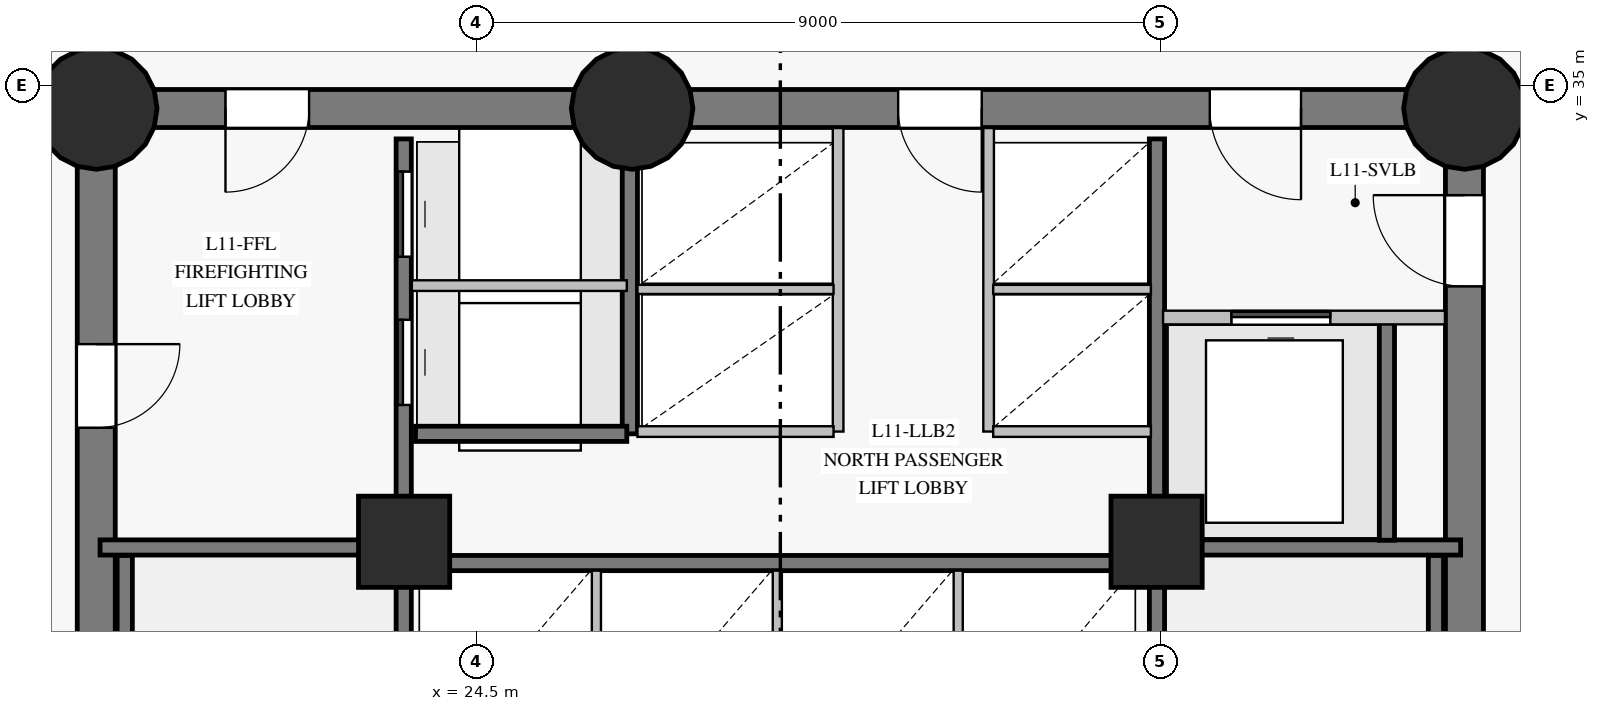
"""IFC4 building model, lengths in metres.
Left out: names, types, materials, properties, quantities, classifications, styles, units other than length and angle.
Written with IfcOpenShell. Run it as: python <this file> out.ifc"""

import sys

from ifc_helpers import new_model, si_unit, direction, frame, frame_2d, origin, origin_with_axes, origin_2d, place, context, subcontext, project, spatial, rectangle, circle, extrude, source, transform, mapped, element, fill, save


model = new_model("IFC4")
c1 = context("Model", 3, precision=1e-05, world=origin(), true_north=direction((0.0, 1.0)))
c2 = subcontext(c1, "Body", "Model", "MODEL_VIEW")
j1 = project(units=[si_unit("LENGTHUNIT", "METRE"), si_unit("PLANEANGLEUNIT", "RADIAN")], contexts=[c1])
p1 = place(None, origin())
s1 = spatial("IfcSite", under=j1, at=p1, CompositionType="ELEMENT")
p2 = place(p1, origin())
s2 = spatial("IfcBuilding", under=s1, at=p2, CompositionType="ELEMENT")
p3 = place(p2, frame((0.0, 0.0, 44.5)))
s3 = spatial("IfcBuildingStorey", under=s2, at=p3, CompositionType="ELEMENT", Elevation=44.5)
p4 = place(p3, frame((37.5, 18.3, 0.0), z_axis=(0.0, 0.0, 1.0), x_axis=(0.0, 1.0, 0.0)))
e1 = element("IfcWall", 1, at=p4, inside=s3, PredefinedType="SHEAR", context=c2, shape_type="SweptSolid", body=[
    extrude(rectangle(XDim=16.4, YDim=0.5, at=frame_2d((8.2, 0.0))), origin(), (0.0, 0.0, 1.0), 3.35),
])
p5 = place(p4, frame((14.06, 0.0, 0.0)))
e2 = element("IfcOpeningElement", 2, at=p5, cuts=e1, PredefinedType="OPENING", context=c2, shape_type="SweptSolid", body=[
    extrude(rectangle(XDim=1.2, YDim=2.15, at=frame_2d((0.6, 1.075))), frame((0.0, 0.26, 0.0), z_axis=(0.0, -1.0, 0.0), x_axis=(1.0, 0.0, 0.0)), (0.0, 0.0, 1.0), 0.52),
])
p6 = place(p3, frame((37.5, 34.7, 0.0), z_axis=(0.0, 0.0, 1.0), x_axis=(-1.0, 0.0, 0.0)))
e3 = element("IfcWall", 3, at=p6, inside=s3, PredefinedType="SHEAR", context=c2, shape_type="SweptSolid", body=[
    extrude(rectangle(XDim=10.95, YDim=0.5, at=frame_2d((5.475, 0.0))), origin(), (0.0, 0.0, 1.0), 3.35),
])
p7 = place(p6, frame((2.15, 0.0, 0.0)))
e4 = element("IfcOpeningElement", 4, at=p7, cuts=e3, PredefinedType="OPENING", context=c2, shape_type="SweptSolid", body=[
    extrude(rectangle(XDim=1.2, YDim=2.15, at=frame_2d((0.6, 1.075))), frame((0.0, 0.26, 0.0), z_axis=(0.0, -1.0, 0.0), x_axis=(1.0, 0.0, 0.0)), (0.0, 0.0, 1.0), 0.52),
])
p8 = place(p6, frame((6.35, 0.0, 0.0)))
e5 = element("IfcOpeningElement", 5, at=p8, cuts=e3, PredefinedType="OPENING", context=c2, shape_type="SweptSolid", body=[
    extrude(rectangle(XDim=1.1, YDim=2.15, at=frame_2d((0.55, 1.075))), frame((0.0, 0.26, 0.0), z_axis=(0.0, -1.0, 0.0), x_axis=(1.0, 0.0, 0.0)), (0.0, 0.0, 1.0), 0.52),
])
p9 = place(p3, frame((26.55, 34.7, 0.0), z_axis=(0.0, 0.0, 1.0), x_axis=(-1.0, 0.0, 0.0)))
e6 = element("IfcWall", 6, at=p9, inside=s3, PredefinedType="SHEAR", context=c2, shape_type="SweptSolid", body=[
    extrude(rectangle(XDim=7.05, YDim=0.5, at=frame_2d((3.525, 0.0))), origin(), (0.0, 0.0, 1.0), 3.35),
])
p10 = place(p9, frame((4.25, 0.0, 0.0)))
e7 = element("IfcOpeningElement", 7, at=p10, cuts=e6, PredefinedType="OPENING", context=c2, shape_type="SweptSolid", body=[
    extrude(rectangle(XDim=1.1, YDim=2.15, at=frame_2d((0.55, 1.075))), frame((0.0, 0.26, 0.0), z_axis=(0.0, -1.0, 0.0), x_axis=(1.0, 0.0, 0.0)), (0.0, 0.0, 1.0), 0.52),
])
p11 = place(p3, frame((19.5, 34.7, 0.0), z_axis=(0.0, 0.0, 1.0), x_axis=(0.0, -1.0, 0.0)))
e8 = element("IfcWall", 8, at=p11, inside=s3, PredefinedType="SHEAR", context=c2, shape_type="SweptSolid", body=[
    extrude(rectangle(XDim=16.4, YDim=0.5, at=frame_2d((8.2, 0.0))), origin(), (0.0, 0.0, 1.0), 3.35),
])
p12 = place(p11, frame((3.1, 0.0, 0.0)))
e9 = element("IfcOpeningElement", 9, at=p12, cuts=e8, PredefinedType="OPENING", context=c2, shape_type="SweptSolid", body=[
    extrude(rectangle(XDim=1.1, YDim=2.15, at=frame_2d((0.55, 1.075))), frame((0.0, 0.26, 0.0), z_axis=(0.0, -1.0, 0.0), x_axis=(1.0, 0.0, 0.0)), (0.0, 0.0, 1.0), 0.52),
])
m1 = source(origin_with_axes(), c2, "Body", "SweptSolid", [
    extrude(circle(Radius=0.8, at=origin_2d()), origin(), (0.0, 0.0, 1.0), 3.6),
])
for number, where, z_axis, x_axis in (
    (10, (19.5, 34.7, 0.0), (0.0, 0.0, 1.0), (1.0, 0.0, 0.0)),
    (11, (26.55, 34.7, 0.0), (0.0, 0.0, 1.0), (1.0, 0.0, 0.0)),
    (12, (37.5, 34.7, 0.0), (0.0, 0.0, 1.0), (1.0, 0.0, 0.0)),
):
    element("IfcColumn", number, at=place(p3, frame(where, z_axis=z_axis, x_axis=x_axis)), inside=s3, PredefinedType="COLUMN", context=c2, shape_type="MappedRepresentation", body=[
        mapped(m1, transform((0.0, 0.0, 0.0), scale=1.0)),
    ])
m2 = source(origin_with_axes(), c2, "Body", "SweptSolid", [
    extrude(rectangle(XDim=1.2, YDim=1.2, at=origin_2d()), origin(), (0.0, 0.0, 1.0), 3.6),
])
for number, where, z_axis, x_axis in (
    (13, (23.55, 29.0, 0.0), (0.0, 0.0, 1.0), (1.0, 0.0, 0.0)),
    (14, (33.45, 29.0, 0.0), (0.0, 0.0, 1.0), (1.0, 0.0, 0.0)),
):
    element("IfcColumn", number, at=place(p3, frame(where, z_axis=z_axis, x_axis=x_axis)), inside=s3, PredefinedType="COLUMN", context=c2, shape_type="MappedRepresentation", body=[
        mapped(m2, transform((0.0, 0.0, 0.0), scale=1.0)),
    ])
p13 = place(p3, frame((23.545, 18.7, 0.0), z_axis=(0.0, 0.0, 1.0), x_axis=(0.0, 1.0, 0.0)))
e15 = element("IfcWall", 15, at=p13, inside=s3, PredefinedType="SHEAR", context=c2, shape_type="SweptSolid", body=[
    extrude(rectangle(XDim=15.6, YDim=0.2, at=frame_2d((7.8, 0.0))), origin(), (0.0, 0.0, 1.0), 3.35),
])
p14 = place(p13, frame((2.75, 0.0, 0.0)))
e16 = element("IfcOpeningElement", 16, at=p14, cuts=e15, PredefinedType="OPENING", context=c2, shape_type="SweptSolid", body=[
    extrude(rectangle(XDim=1.15, YDim=2.15, at=frame_2d((0.575, 1.075))), frame((0.0, 0.11, 0.0), z_axis=(0.0, -1.0, 0.0), x_axis=(1.0, 0.0, 0.0)), (0.0, 0.0, 1.0), 0.22),
])
p15 = place(p13, frame((0.14, 0.0, 0.0)))
e17 = element("IfcOpeningElement", 17, at=p15, cuts=e15, PredefinedType="OPENING", context=c2, shape_type="SweptSolid", body=[
    extrude(rectangle(XDim=0.88, YDim=2.1, at=frame_2d((0.44, 1.05))), frame((0.0, 0.11, 0.0), z_axis=(0.0, -1.0, 0.0), x_axis=(1.0, 0.0, 0.0)), (0.0, 0.0, 1.0), 0.22),
])
p16 = place(p13, frame((1.36, 0.0, 0.0)))
e18 = element("IfcOpeningElement", 18, at=p16, cuts=e15, PredefinedType="OPENING", context=c2, shape_type="SweptSolid", body=[
    extrude(rectangle(XDim=0.88, YDim=2.1, at=frame_2d((0.44, 1.05))), frame((0.0, 0.11, 0.0), z_axis=(0.0, -1.0, 0.0), x_axis=(1.0, 0.0, 0.0)), (0.0, 0.0, 1.0), 0.22),
])
p17 = place(p13, frame((12.1, 0.0, 0.0)))
e19 = element("IfcOpeningElement", 19, at=p17, cuts=e15, PredefinedType="OPENING", context=c2, shape_type="SweptSolid", body=[
    extrude(rectangle(XDim=1.12, YDim=2.15, at=frame_2d((0.56, 1.075))), frame((0.0, 0.11, 0.0), z_axis=(0.0, -1.0, 0.0), x_axis=(1.0, 0.0, 0.0)), (0.0, 0.0, 1.0), 0.22),
])
p18 = place(p13, frame((14.05, 0.0, 0.0)))
e20 = element("IfcOpeningElement", 20, at=p18, cuts=e15, PredefinedType="OPENING", context=c2, shape_type="SweptSolid", body=[
    extrude(rectangle(XDim=1.12, YDim=2.15, at=frame_2d((0.56, 1.075))), frame((0.0, 0.11, 0.0), z_axis=(0.0, -1.0, 0.0), x_axis=(1.0, 0.0, 0.0)), (0.0, 0.0, 1.0), 0.22),
])
p19 = place(p3, frame((33.455, 18.7, 0.0), z_axis=(0.0, 0.0, 1.0), x_axis=(0.0, 1.0, 0.0)))
e21 = element("IfcWall", 21, at=p19, inside=s3, PredefinedType="SHEAR", context=c2, shape_type="SweptSolid", body=[
    extrude(rectangle(XDim=15.6, YDim=0.2, at=frame_2d((7.8, 0.0))), origin(), (0.0, 0.0, 1.0), 3.35),
])
p20 = place(p19, frame((2.75, 0.0, 0.0)))
e22 = element("IfcOpeningElement", 22, at=p20, cuts=e21, PredefinedType="OPENING", context=c2, shape_type="SweptSolid", body=[
    extrude(rectangle(XDim=1.15, YDim=2.15, at=frame_2d((0.575, 1.075))), frame((0.0, 0.11, 0.0), z_axis=(0.0, -1.0, 0.0), x_axis=(1.0, 0.0, 0.0)), (0.0, 0.0, 1.0), 0.22),
])
p21 = place(p19, frame((0.55, 0.0, 0.0)))
e23 = element("IfcOpeningElement", 23, at=p21, cuts=e21, PredefinedType="OPENING", context=c2, shape_type="SweptSolid", body=[
    extrude(rectangle(XDim=0.94, YDim=2.1, at=frame_2d((0.47, 1.05))), frame((0.0, 0.11, 0.0), z_axis=(0.0, -1.0, 0.0), x_axis=(1.0, 0.0, 0.0)), (0.0, 0.0, 1.0), 0.22),
])
p22 = place(p3, frame((23.7, 28.72, 0.0), z_axis=(0.0, 0.0, 1.0), x_axis=(1.0, 0.0, 0.0)))
e24 = element("IfcWall", 24, at=p22, inside=s3, PredefinedType="SHEAR", context=c2, shape_type="SweptSolid", body=[
    extrude(rectangle(XDim=9.6, YDim=0.2, at=frame_2d((4.8, 0.0))), origin(), (0.0, 0.0, 1.0), 3.35),
])
for number, where, z_axis, x_axis in (
    (25, (19.875, 21.32, 0.0), (0.0, 0.0, 1.0), (0.0, 1.0, 0.0)),
    (26, (37.125, 21.32, 0.0), (0.0, 0.0, 1.0), (0.0, 1.0, 0.0)),
):
    element("IfcWall", number, at=place(p3, frame(where, z_axis=z_axis, x_axis=x_axis)), inside=s3, PredefinedType="SHEAR", context=c2, shape_type="SweptSolid", body=[
        extrude(rectangle(XDim=7.5, YDim=0.2, at=frame_2d((3.75, 0.0))), origin(), (0.0, 0.0, 1.0), 3.35),
    ])
for number, where, z_axis, x_axis in (
    (27, (33.455, 28.925, 0.0), (0.0, 0.0, 1.0), (1.0, 0.0, 0.0)),
    (28, (19.55, 28.925, 0.0), (0.0, 0.0, 1.0), (1.0, 0.0, 0.0)),
):
    element("IfcWall", number, at=place(p3, frame(where, z_axis=z_axis, x_axis=x_axis)), inside=s3, PredefinedType="SHEAR", context=c2, shape_type="SweptSolid", body=[
        extrude(rectangle(XDim=3.995, YDim=0.2, at=frame_2d((1.998, 0.0))), origin(), (0.0, 0.0, 1.0), 3.35),
    ])
p23 = place(p3, frame((26.52, 30.42, 0.0), z_axis=(0.0, 0.0, 1.0), x_axis=(0.0, 1.0, 0.0)))
e29 = element("IfcWall", 29, at=p23, inside=s3, PredefinedType="SHEAR", context=c2, shape_type="SweptSolid", body=[
    extrude(rectangle(XDim=3.86, YDim=0.2, at=frame_2d((1.93, 0.0))), origin(), (0.0, 0.0, 1.0), 3.35),
])
p24 = place(p3, frame((36.48, 29.02, 0.0), z_axis=(0.0, 0.0, 1.0), x_axis=(0.0, 1.0, 0.0)))
e30 = element("IfcWall", 30, at=p24, inside=s3, PredefinedType="SHEAR", context=c2, shape_type="SweptSolid", body=[
    extrude(rectangle(XDim=2.86, YDim=0.2, at=frame_2d((1.43, 0.0))), origin(), (0.0, 0.0, 1.0), 3.35),
])
p25 = place(p3, frame((23.7, 30.42, 0.0), z_axis=(0.0, 0.0, 1.0), x_axis=(1.0, 0.0, 0.0)))
e31 = element("IfcWall", 31, at=p25, inside=s3, PredefinedType="SHEAR", context=c2, shape_type="SweptSolid", body=[
    extrude(rectangle(XDim=2.78, YDim=0.2, at=frame_2d((1.39, 0.0))), origin(), (0.0, 0.0, 1.0), 3.35),
])
for number, where, z_axis, x_axis in (
    (32, (29.26, 30.45, 0.0), (0.0, 0.0, 1.0), (0.0, 1.0, 0.0)),
    (33, (31.24, 30.45, 0.0), (0.0, 0.0, 1.0), (0.0, 1.0, 0.0)),
):
    element("IfcWall", number, at=place(p3, frame(where, z_axis=z_axis, x_axis=x_axis)), inside=s3, PredefinedType="PARTITIONING", context=c2, shape_type="SweptSolid", body=[
        extrude(rectangle(XDim=3.993, YDim=0.14, at=frame_2d((1.997, 0.0))), origin(), (0.0, 0.0, 1.0), 3.35),
    ])
p26 = place(p3, frame((33.535, 31.95, 0.0), z_axis=(0.0, 0.0, 1.0), x_axis=(1.0, 0.0, 0.0)))
e34 = element("IfcWall", 34, at=p26, inside=s3, PredefinedType="PARTITIONING", context=c2, shape_type="SweptSolid", body=[
    extrude(rectangle(XDim=3.709, YDim=0.18, at=frame_2d((1.854, 0.0))), origin(), (0.0, 0.0, 1.0), 3.35),
])
p27 = place(p26, frame((0.9, 0.0, 0.0)))
e35 = element("IfcOpeningElement", 35, at=p27, cuts=e34, PredefinedType="OPENING", context=c2, shape_type="SweptSolid", body=[
    extrude(rectangle(XDim=1.3, YDim=2.2, at=frame_2d((0.65, 1.1))), frame((0.0, 0.1, 0.0), z_axis=(0.0, -1.0, 0.0), x_axis=(1.0, 0.0, 0.0)), (0.0, 0.0, 1.0), 0.2),
])
p28 = place(p3, frame((23.652, 32.37, 0.0), z_axis=(0.0, 0.0, 1.0), x_axis=(1.0, 0.0, 0.0)))
e36 = element("IfcWall", 36, at=p28, inside=s3, PredefinedType="PARTITIONING", context=c2, shape_type="SweptSolid", body=[
    extrude(rectangle(XDim=2.828, YDim=0.14, at=frame_2d((1.414, 0.0))), origin(), (0.0, 0.0, 1.0), 3.35),
])
for number, where, z_axis, x_axis in (
    (37, (26.08, 26.02, 0.0), (0.0, 0.0, 1.0), (0.0, 1.0, 0.0)),
    (38, (28.46, 26.02, 0.0), (0.0, 0.0, 1.0), (0.0, 1.0, 0.0)),
    (39, (30.84, 26.02, 0.0), (0.0, 0.0, 1.0), (0.0, 1.0, 0.0)),
):
    element("IfcWall", number, at=place(p3, frame(where, z_axis=z_axis, x_axis=x_axis)), inside=s3, PredefinedType="PARTITIONING", context=c2, shape_type="SweptSolid", body=[
        extrude(rectangle(XDim=2.6, YDim=0.12, at=frame_2d((1.3, 0.0))), origin(), (0.0, 0.0, 1.0), 3.35),
    ])
p29 = place(p3, frame((26.62, 30.45, 0.0), z_axis=(0.0, 0.0, 1.0), x_axis=(1.0, 0.0, 0.0)))
e40 = element("IfcWall", 40, at=p29, inside=s3, PredefinedType="PARTITIONING", context=c2, shape_type="SweptSolid", body=[
    extrude(rectangle(XDim=2.58, YDim=0.14, at=frame_2d((1.29, 0.0))), origin(), (0.0, 0.0, 1.0), 3.35),
])
p30 = place(p3, frame((26.62, 32.32, 0.0), z_axis=(0.0, 0.0, 1.0), x_axis=(1.0, 0.0, 0.0)))
e41 = element("IfcWall", 41, at=p30, inside=s3, PredefinedType="PARTITIONING", context=c2, shape_type="SweptSolid", body=[
    extrude(rectangle(XDim=2.58, YDim=0.12, at=frame_2d((1.29, 0.0))), origin(), (0.0, 0.0, 1.0), 3.35),
])
p31 = place(p3, frame((31.3, 30.45, 0.0), z_axis=(0.0, 0.0, 1.0), x_axis=(1.0, 0.0, 0.0)))
e42 = element("IfcWall", 42, at=p31, inside=s3, PredefinedType="PARTITIONING", context=c2, shape_type="SweptSolid", body=[
    extrude(rectangle(XDim=2.075, YDim=0.14, at=frame_2d((1.038, 0.0))), origin(), (0.0, 0.0, 1.0), 3.35),
])
p32 = place(p3, frame((31.3, 32.32, 0.0), z_axis=(0.0, 0.0, 1.0), x_axis=(1.0, 0.0, 0.0)))
e43 = element("IfcWall", 43, at=p32, inside=s3, PredefinedType="PARTITIONING", context=c2, shape_type="SweptSolid", body=[
    extrude(rectangle(XDim=2.075, YDim=0.12, at=frame_2d((1.038, 0.0))), origin(), (0.0, 0.0, 1.0), 3.35),
])
m3 = source(origin_with_axes(), c2, "Body", "SweptSolid", [
    extrude(rectangle(XDim=1.1, YDim=2.15, at=frame_2d((0.55, 1.075))), frame((0.0, 0.025, 0.0), z_axis=(0.0, -1.0, 0.0), x_axis=(1.0, 0.0, 0.0)), (0.0, 0.0, 1.0), 0.05),
])
p33 = place(p10, origin())
e44 = element("IfcDoor", 44, at=p33, inside=s3, OperationType="SINGLE_SWING_RIGHT", PredefinedType="DOOR", context=c2, shape_type="MappedRepresentation", body=[
    mapped(m3, transform((0.0, 0.0, 0.0), scale=1.0)),
])
fill(e7, e44)
p34 = place(p12, origin())
e45 = element("IfcDoor", 45, at=p34, inside=s3, OperationType="SINGLE_SWING_LEFT", PredefinedType="DOOR", context=c2, shape_type="MappedRepresentation", body=[
    mapped(m3, transform((0.0, 0.0, 0.0), scale=1.0)),
])
fill(e9, e45)
m4 = source(origin_with_axes(), c2, "Body", "SweptSolid", [
    extrude(rectangle(XDim=1.2, YDim=2.15, at=frame_2d((0.6, 1.075))), frame((0.0, 0.025, 0.0), z_axis=(0.0, -1.0, 0.0), x_axis=(1.0, 0.0, 0.0)), (0.0, 0.0, 1.0), 0.05),
])
p35 = place(p5, origin())
e46 = element("IfcDoor", 46, at=p35, inside=s3, OperationType="SINGLE_SWING_RIGHT", PredefinedType="DOOR", context=c2, shape_type="MappedRepresentation", body=[
    mapped(m4, transform((0.0, 0.0, 0.0), scale=1.0)),
])
fill(e2, e46)
p36 = place(p7, origin())
e47 = element("IfcDoor", 47, at=p36, inside=s3, OperationType="SINGLE_SWING_LEFT", PredefinedType="DOOR", context=c2, shape_type="MappedRepresentation", body=[
    mapped(m4, transform((0.0, 0.0, 0.0), scale=1.0)),
])
fill(e4, e47)
m5 = source(origin_with_axes(), c2, "Body", "SweptSolid", [
    extrude(rectangle(XDim=1.3, YDim=2.2, at=frame_2d((0.65, 1.1))), frame((0.0, 0.025, 0.0), z_axis=(0.0, -1.0, 0.0), x_axis=(1.0, 0.0, 0.0)), (0.0, 0.0, 1.0), 0.05),
])
p37 = place(p27, origin())
e48 = element("IfcDoor", 48, at=p37, inside=s3, OperationType="SLIDING_TO_LEFT", PredefinedType="DOOR", context=c2, shape_type="MappedRepresentation", body=[
    mapped(m5, transform((0.0, 0.0, 0.0), scale=1.0)),
])
fill(e35, e48)
p38 = place(p8, origin())
e49 = element("IfcDoor", 49, at=p38, inside=s3, OperationType="SINGLE_SWING_LEFT", PredefinedType="DOOR", context=c2, shape_type="MappedRepresentation", body=[
    mapped(m3, transform((0.0, 0.0, 0.0), scale=1.0)),
])
fill(e5, e49)
m6 = source(origin_with_axes(), c2, "Body", "SweptSolid", [
    extrude(rectangle(XDim=1.12, YDim=2.15, at=frame_2d((0.56, 1.075))), frame((0.0, 0.025, 0.0), z_axis=(0.0, -1.0, 0.0), x_axis=(1.0, 0.0, 0.0)), (0.0, 0.0, 1.0), 0.05),
])
p39 = place(p17, origin())
e50 = element("IfcDoor", 50, at=p39, inside=s3, OperationType="SLIDING_TO_LEFT", PredefinedType="DOOR", context=c2, shape_type="MappedRepresentation", body=[
    mapped(m6, transform((0.0, 0.0, 0.0), scale=1.0)),
])
fill(e19, e50)
p40 = place(p18, origin())
e51 = element("IfcDoor", 51, at=p40, inside=s3, OperationType="SLIDING_TO_RIGHT", PredefinedType="DOOR", context=c2, shape_type="MappedRepresentation", body=[
    mapped(m6, transform((0.0, 0.0, 0.0), scale=1.0)),
])
fill(e20, e51)
save(model, sys.argv[1])
